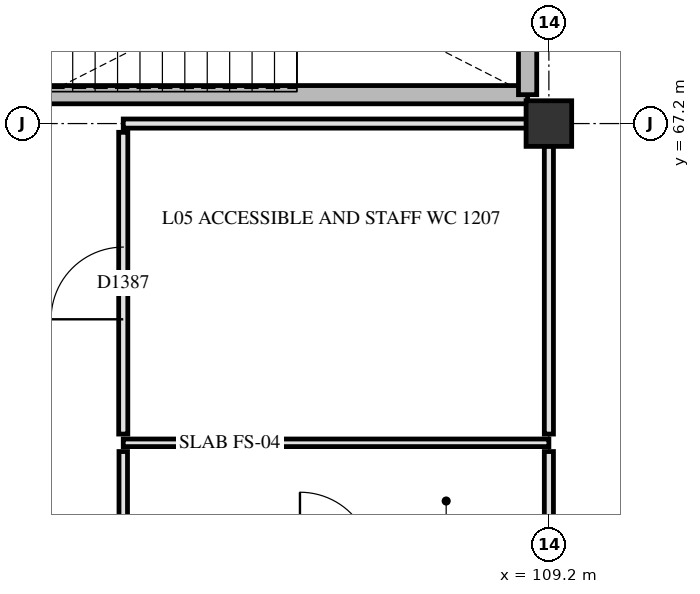
"""IFC4 building model, lengths in metres.
Left out: names, types, materials, properties, quantities, classifications, styles, units other than length and angle.
Written with IfcOpenShell. Run it as: python <this file> out.ifc"""

import sys

from ifc_helpers import new_model, si_unit, direction, frame, frame_2d, origin, origin_2d, place, context, subcontext, project, spatial, rectangle, extrude, element, fill, save


model = new_model("IFC4")
c1 = context("Model", 3, precision=1e-05, world=origin(), true_north=direction((0.0, 1.0)))
c2 = subcontext(c1, "Body", "Model", "MODEL_VIEW")
j1 = project(units=[si_unit("LENGTHUNIT", "METRE"), si_unit("PLANEANGLEUNIT", "RADIAN")], contexts=[c1])
p1 = place(None, origin())
s1 = spatial("IfcSite", under=j1, at=p1, CompositionType="ELEMENT")
p2 = place(p1, origin())
s2 = spatial("IfcBuilding", under=s1, at=p2, CompositionType="ELEMENT")
p3 = place(p2, frame((0.0, 0.0, 22.5)))
s3 = spatial("IfcBuildingStorey", under=s2, at=p3, CompositionType="ELEMENT", Elevation=22.5)
p4 = place(p3, frame((109.2, 67.2, 0.0), z_axis=(0.0, 0.0, 1.0), x_axis=(1.0, 0.0, 0.0)))
e1 = element("IfcColumn", 1, at=p4, inside=s3, PredefinedType="COLUMN", context=c2, shape_type="SweptSolid", body=[
    extrude(rectangle(XDim=0.6, YDim=0.6, at=origin_2d()), origin(), (0.0, 0.0, 1.0), 3.9),
])
p5 = place(p3, frame((101.1, 67.58, 0.0), z_axis=(0.0, 0.0, 1.0), x_axis=(1.0, 0.0, 0.0)))
e2 = element("IfcWall", 2, at=p5, inside=s3, PredefinedType="SHEAR", context=c2, shape_type="SweptSolid", body=[
    extrude(rectangle(XDim=7.82, YDim=0.24, at=frame_2d((3.91, 0.0))), origin(), (0.0, 0.0, 1.0), 3.62),
])
p6 = place(p3, frame((108.92, 67.58, 0.0), z_axis=(0.0, 0.0, 1.0), x_axis=(0.0, 1.0, 0.0)))
e3 = element("IfcWall", 3, at=p6, inside=s3, PredefinedType="SHEAR", context=c2, shape_type="SweptSolid", body=[
    extrude(rectangle(XDim=3.32, YDim=0.24, at=frame_2d((1.66, 0.0))), origin(), (0.0, 0.0, 1.0), 3.62),
])
p7 = place(p3, frame((103.6, 63.0, 0.0), z_axis=(0.0, 0.0, 1.0), x_axis=(1.0, 0.0, 0.0)))
e4 = element("IfcWall", 4, at=p7, inside=s3, PredefinedType="PARTITIONING", context=c2, shape_type="SweptSolid", body=[
    extrude(rectangle(XDim=5.6, YDim=0.1, at=frame_2d((2.8, 0.0))), origin(), (0.0, 0.0, 1.0), 3.3),
])
p8 = place(p3, frame((103.6, 67.2, 0.0), z_axis=(0.0, 0.0, 1.0), x_axis=(1.0, 0.0, 0.0)))
e5 = element("IfcWall", 5, at=p8, inside=s3, PredefinedType="PARTITIONING", context=c2, shape_type="SweptSolid", body=[
    extrude(rectangle(XDim=5.305, YDim=0.12, at=frame_2d((2.652, 0.0))), origin(), (0.0, 0.0, 1.0), 3.16),
])
p9 = place(p3, frame((103.6, 61.515, 0.0), z_axis=(0.0, 0.0, 1.0), x_axis=(0.0, 1.0, 0.0)))
e6 = element("IfcWall", 6, at=p9, inside=s3, PredefinedType="PARTITIONING", context=c2, shape_type="SweptSolid", body=[
    extrude(rectangle(XDim=1.37, YDim=0.112, at=frame_2d((0.685, 0.0))), origin(), (0.0, 0.0, 1.0), 3.34),
])
p10 = place(p3, frame((103.6, 63.115, 0.0), z_axis=(0.0, 0.0, 1.0), x_axis=(0.0, 1.0, 0.0)))
e7 = element("IfcWall", 7, at=p10, inside=s3, PredefinedType="PARTITIONING", context=c2, shape_type="SweptSolid", body=[
    extrude(rectangle(XDim=3.97, YDim=0.12, at=frame_2d((1.985, 0.0))), origin(), (0.0, 0.0, 1.0), 3.34),
])
p11 = place(p10, frame((1.51, 0.0, 0.0)))
e8 = element("IfcOpeningElement", 8, at=p11, cuts=e7, PredefinedType="OPENING", context=c2, shape_type="SweptSolid", body=[
    extrude(rectangle(XDim=0.95, YDim=2.1, at=frame_2d((0.475, 1.05))), frame((0.0, 0.07, 0.0), z_axis=(0.0, -1.0, 0.0), x_axis=(1.0, 0.0, 0.0)), (0.0, 0.0, 1.0), 0.14),
])
p12 = place(p3, frame((109.2, 61.515, 0.0), z_axis=(0.0, 0.0, 1.0), x_axis=(0.0, 1.0, 0.0)))
e9 = element("IfcWall", 9, at=p12, inside=s3, PredefinedType="PARTITIONING", context=c2, shape_type="SweptSolid", body=[
    extrude(rectangle(XDim=1.37, YDim=0.12, at=frame_2d((0.685, 0.0))), origin(), (0.0, 0.0, 1.0), 3.3),
])
p13 = place(p3, frame((109.2, 63.115, 0.0), z_axis=(0.0, 0.0, 1.0), x_axis=(0.0, 1.0, 0.0)))
e10 = element("IfcWall", 10, at=p13, inside=s3, PredefinedType="PARTITIONING", context=c2, shape_type="SweptSolid", body=[
    extrude(rectangle(XDim=3.79, YDim=0.12, at=frame_2d((1.895, 0.0))), origin(), (0.0, 0.0, 1.0), 3.3),
])
p14 = place(p11, origin())
e11 = element("IfcDoor", 11, at=p14, inside=s3, OperationType="SINGLE_SWING_LEFT", PredefinedType="DOOR", context=c2, shape_type="SweptSolid", body=[
    extrude(rectangle(XDim=0.95, YDim=2.1, at=frame_2d((0.475, 1.05))), frame((0.0, 0.025, 0.0), z_axis=(0.0, -1.0, 0.0), x_axis=(1.0, 0.0, 0.0)), (0.0, 0.0, 1.0), 0.05),
])
fill(e8, e11)
save(model, sys.argv[1])
